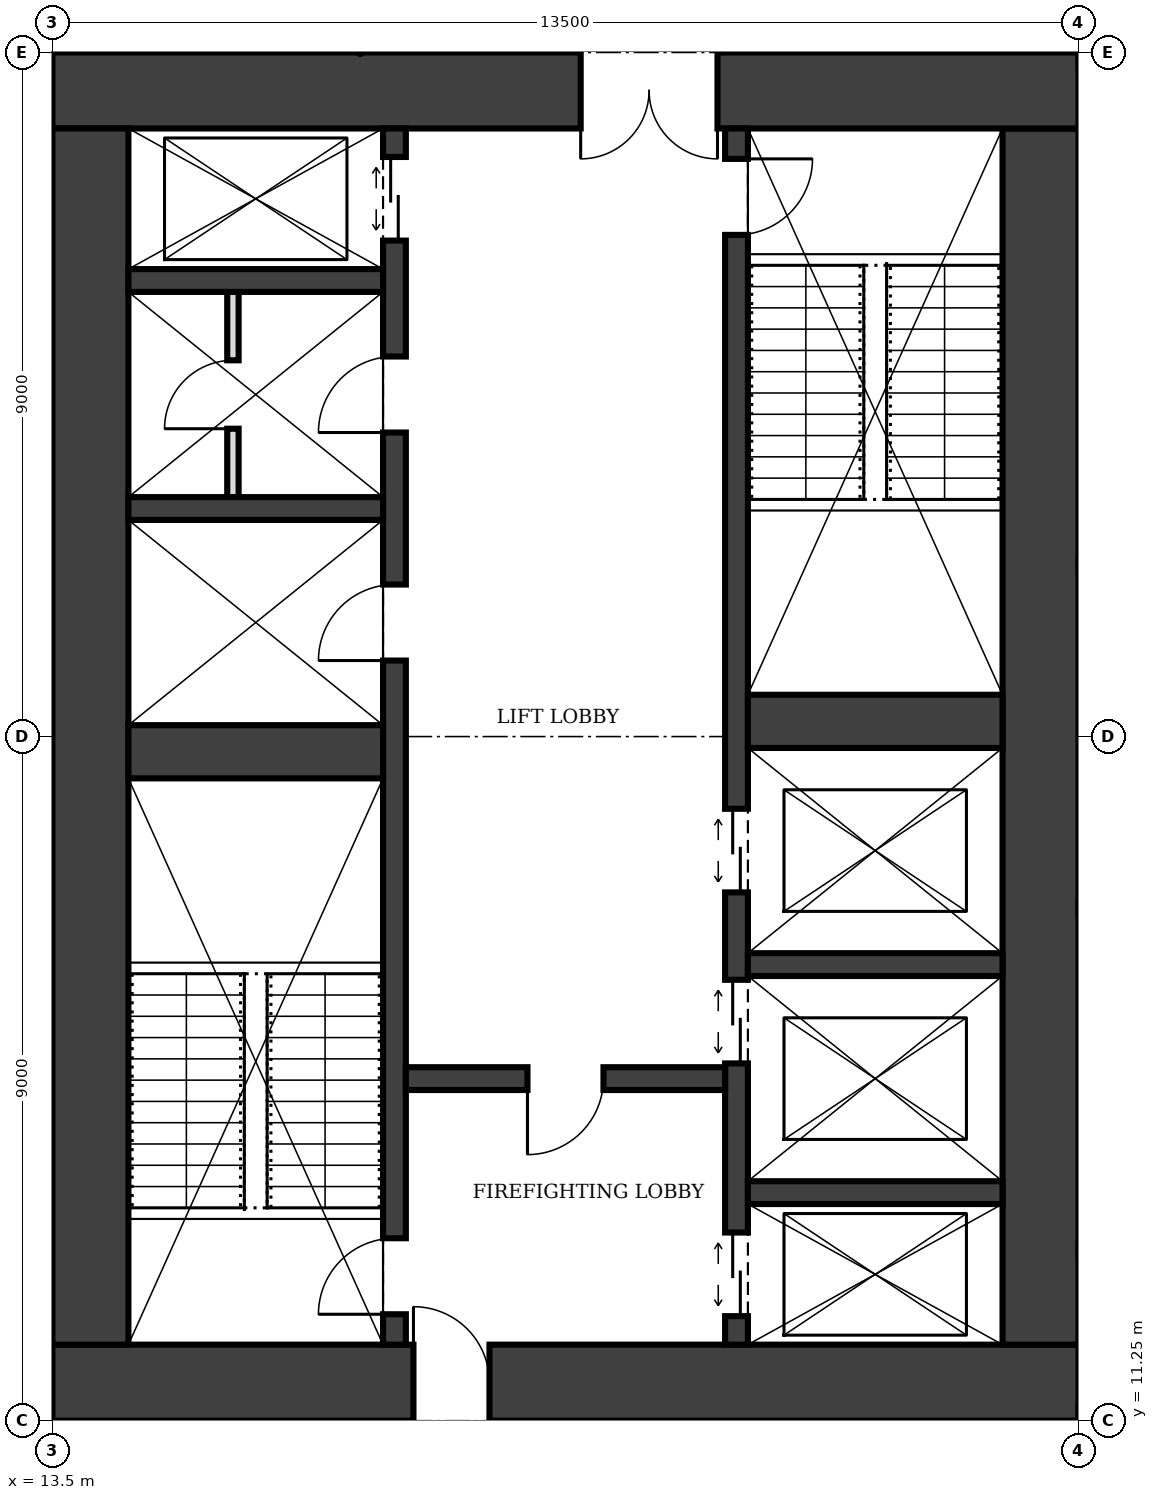
"""IFC4 building model, lengths in metres.
Left out: names, types, materials, properties, quantities, classifications, styles, units other than length and angle.
Written with IfcOpenShell. Run it as: python <this file> out.ifc"""

import sys

from ifc_helpers import new_model, si_unit, direction, frame, frame_2d, origin, place, context, subcontext, project, spatial, rectangle, extrude, element, fill, save


model = new_model("IFC4")
c1 = context("Model", 3, precision=1e-05, world=origin(), true_north=direction((0.0, 1.0)))
c2 = subcontext(c1, "Body", "Model", "MODEL_VIEW")
j1 = project(units=[si_unit("LENGTHUNIT", "METRE"), si_unit("PLANEANGLEUNIT", "RADIAN")], contexts=[c1])
p1 = place(None, origin())
s1 = spatial("IfcSite", under=j1, at=p1, CompositionType="ELEMENT")
p2 = place(p1, origin())
s2 = spatial("IfcBuilding", under=s1, at=p2, CompositionType="ELEMENT")
p3 = place(p2, frame((0.0, 0.0, 153.0)))
s3 = spatial("IfcBuildingStorey", under=s2, at=p3, CompositionType="ELEMENT", Elevation=153.0)
p4 = place(p3, frame((13.5, 11.75, 0.0), z_axis=(0.0, 0.0, 1.0), x_axis=(1.0, 0.0, 0.0)))
e1 = element("IfcWall", 1, at=p4, inside=s3, PredefinedType="SHEAR", context=c2, shape_type="SweptSolid", body=[
    extrude(rectangle(XDim=13.5, YDim=1.0, at=frame_2d((6.75, 0.0))), origin(), (0.0, 0.0, 1.0), 4.0),
])
p5 = place(p4, frame((4.75, 0.0, 0.0)))
e2 = element("IfcOpeningElement", 2, at=p5, cuts=e1, PredefinedType="OPENING", context=c2, shape_type="SweptSolid", body=[
    extrude(rectangle(XDim=1.0, YDim=2.1, at=frame_2d((0.5, 1.05))), frame((0.0, 0.51, 0.0), z_axis=(0.0, -1.0, 0.0), x_axis=(1.0, 0.0, 0.0)), (0.0, 0.0, 1.0), 1.02),
])
p6 = place(p3, frame((26.5, 12.25, 0.0), z_axis=(0.0, 0.0, 1.0), x_axis=(0.0, 1.0, 0.0)))
e3 = element("IfcWall", 3, at=p6, inside=s3, PredefinedType="SHEAR", context=c2, shape_type="SweptSolid", body=[
    extrude(rectangle(XDim=16.0, YDim=1.0, at=frame_2d((8.0, 0.0))), origin(), (0.0, 0.0, 1.0), 4.0),
])
p7 = place(p3, frame((27.0, 28.75, 0.0), z_axis=(0.0, 0.0, 1.0), x_axis=(-1.0, 0.0, 0.0)))
e4 = element("IfcWall", 4, at=p7, inside=s3, PredefinedType="SHEAR", context=c2, shape_type="SweptSolid", body=[
    extrude(rectangle(XDim=13.5, YDim=1.0, at=frame_2d((6.75, 0.0))), origin(), (0.0, 0.0, 1.0), 4.0),
])
p8 = place(p7, frame((4.75, 0.0, 0.0)))
e5 = element("IfcOpeningElement", 5, at=p8, cuts=e4, PredefinedType="OPENING", context=c2, shape_type="SweptSolid", body=[
    extrude(rectangle(XDim=1.8, YDim=2.1, at=frame_2d((0.9, 1.05))), frame((0.0, 0.51, 0.0), z_axis=(0.0, -1.0, 0.0), x_axis=(1.0, 0.0, 0.0)), (0.0, 0.0, 1.0), 1.02),
])
p9 = place(p3, frame((14.0, 28.25, 0.0), z_axis=(0.0, 0.0, 1.0), x_axis=(0.0, -1.0, 0.0)))
e6 = element("IfcWall", 6, at=p9, inside=s3, PredefinedType="SHEAR", context=c2, shape_type="SweptSolid", body=[
    extrude(rectangle(XDim=16.0, YDim=1.0, at=frame_2d((8.0, 0.0))), origin(), (0.0, 0.0, 1.0), 4.0),
])
p10 = place(p3, frame((18.0, 12.25, 0.0), z_axis=(0.0, 0.0, 1.0), x_axis=(0.0, 1.0, 0.0)))
e7 = element("IfcWall", 7, at=p10, inside=s3, PredefinedType="SHEAR", context=c2, shape_type="SweptSolid", body=[
    extrude(rectangle(XDim=16.0, YDim=0.3, at=frame_2d((8.0, 0.0))), origin(), (0.0, 0.0, 1.0), 4.0),
])
p11 = place(p10, frame((0.4, 0.0, 0.0)))
e8 = element("IfcOpeningElement", 8, at=p11, cuts=e7, PredefinedType="OPENING", context=c2, shape_type="SweptSolid", body=[
    extrude(rectangle(XDim=1.0, YDim=2.1, at=frame_2d((0.5, 1.05))), frame((0.0, 0.16, 0.0), z_axis=(0.0, -1.0, 0.0), x_axis=(1.0, 0.0, 0.0)), (0.0, 0.0, 1.0), 0.32),
])
p12 = place(p10, frame((14.525, 0.0, 0.0)))
e9 = element("IfcOpeningElement", 9, at=p12, cuts=e7, PredefinedType="OPENING", context=c2, shape_type="SweptSolid", body=[
    extrude(rectangle(XDim=1.1, YDim=2.1, at=frame_2d((0.55, 1.05))), frame((0.0, 0.16, 0.0), z_axis=(0.0, -1.0, 0.0), x_axis=(1.0, 0.0, 0.0)), (0.0, 0.0, 1.0), 0.32),
])
p13 = place(p10, frame((9.0, 0.0, 0.0)))
e10 = element("IfcOpeningElement", 10, at=p13, cuts=e7, PredefinedType="OPENING", context=c2, shape_type="SweptSolid", body=[
    extrude(rectangle(XDim=1.0, YDim=2.1, at=frame_2d((0.5, 1.05))), frame((0.0, 0.16, 0.0), z_axis=(0.0, -1.0, 0.0), x_axis=(1.0, 0.0, 0.0)), (0.0, 0.0, 1.0), 0.32),
])
p14 = place(p10, frame((12.0, 0.0, 0.0)))
e11 = element("IfcOpeningElement", 11, at=p14, cuts=e7, PredefinedType="OPENING", context=c2, shape_type="SweptSolid", body=[
    extrude(rectangle(XDim=1.0, YDim=2.1, at=frame_2d((0.5, 1.05))), frame((0.0, 0.16, 0.0), z_axis=(0.0, -1.0, 0.0), x_axis=(1.0, 0.0, 0.0)), (0.0, 0.0, 1.0), 0.32),
])
p15 = place(p3, frame((22.5, 12.25, 0.0), z_axis=(0.0, 0.0, 1.0), x_axis=(0.0, 1.0, 0.0)))
e12 = element("IfcWall", 12, at=p15, inside=s3, PredefinedType="SHEAR", context=c2, shape_type="SweptSolid", body=[
    extrude(rectangle(XDim=16.0, YDim=0.3, at=frame_2d((8.0, 0.0))), origin(), (0.0, 0.0, 1.0), 4.0),
])
p16 = place(p15, frame((14.6, 0.0, 0.0)))
e13 = element("IfcOpeningElement", 13, at=p16, cuts=e12, PredefinedType="OPENING", context=c2, shape_type="SweptSolid", body=[
    extrude(rectangle(XDim=1.0, YDim=2.1, at=frame_2d((0.5, 1.05))), frame((0.0, 0.16, 0.0), z_axis=(0.0, -1.0, 0.0), x_axis=(1.0, 0.0, 0.0)), (0.0, 0.0, 1.0), 0.32),
])
p17 = place(p15, frame((0.375, 0.0, 0.0)))
e14 = element("IfcOpeningElement", 14, at=p17, cuts=e12, PredefinedType="OPENING", context=c2, shape_type="SweptSolid", body=[
    extrude(rectangle(XDim=1.1, YDim=2.1, at=frame_2d((0.55, 1.05))), frame((0.0, 0.16, 0.0), z_axis=(0.0, -1.0, 0.0), x_axis=(1.0, 0.0, 0.0)), (0.0, 0.0, 1.0), 0.32),
])
p18 = place(p15, frame((3.7, 0.0, 0.0)))
e15 = element("IfcOpeningElement", 15, at=p18, cuts=e12, PredefinedType="OPENING", context=c2, shape_type="SweptSolid", body=[
    extrude(rectangle(XDim=1.1, YDim=2.1, at=frame_2d((0.55, 1.05))), frame((0.0, 0.16, 0.0), z_axis=(0.0, -1.0, 0.0), x_axis=(1.0, 0.0, 0.0)), (0.0, 0.0, 1.0), 0.32),
])
p19 = place(p15, frame((5.95, 0.0, 0.0)))
e16 = element("IfcOpeningElement", 16, at=p19, cuts=e12, PredefinedType="OPENING", context=c2, shape_type="SweptSolid", body=[
    extrude(rectangle(XDim=1.1, YDim=2.1, at=frame_2d((0.55, 1.05))), frame((0.0, 0.16, 0.0), z_axis=(0.0, -1.0, 0.0), x_axis=(1.0, 0.0, 0.0)), (0.0, 0.0, 1.0), 0.32),
])
p20 = place(p3, frame((14.5, 20.05, 0.0), z_axis=(0.0, 0.0, 1.0), x_axis=(1.0, 0.0, 0.0)))
e17 = element("IfcWall", 17, at=p20, inside=s3, PredefinedType="SHEAR", context=c2, shape_type="SweptSolid", body=[
    extrude(rectangle(XDim=3.35, YDim=0.7, at=frame_2d((1.675, 0.0))), origin(), (0.0, 0.0, 1.0), 4.0),
])
p21 = place(p3, frame((18.15, 15.75, 0.0), z_axis=(0.0, 0.0, 1.0), x_axis=(1.0, 0.0, 0.0)))
e18 = element("IfcWall", 18, at=p21, inside=s3, PredefinedType="SHEAR", context=c2, shape_type="SweptSolid", body=[
    extrude(rectangle(XDim=4.2, YDim=0.3, at=frame_2d((2.1, 0.0))), origin(), (0.0, 0.0, 1.0), 4.0),
])
p22 = place(p21, frame((1.6, 0.0, 0.0)))
e19 = element("IfcOpeningElement", 19, at=p22, cuts=e18, PredefinedType="OPENING", context=c2, shape_type="SweptSolid", body=[
    extrude(rectangle(XDim=1.0, YDim=2.1, at=frame_2d((0.5, 1.05))), frame((0.0, 0.16, 0.0), z_axis=(0.0, -1.0, 0.0), x_axis=(1.0, 0.0, 0.0)), (0.0, 0.0, 1.0), 0.32),
])
for number, where, z_axis, x_axis in (
    (20, (22.65, 14.25, 0.0), (0.0, 0.0, 1.0), (1.0, 0.0, 0.0)),
    (21, (22.65, 17.25, 0.0), (0.0, 0.0, 1.0), (1.0, 0.0, 0.0)),
):
    element("IfcWall", number, at=place(p3, frame(where, z_axis=z_axis, x_axis=x_axis)), inside=s3, PredefinedType="SHEAR", context=c2, shape_type="SweptSolid", body=[
        extrude(rectangle(XDim=3.35, YDim=0.3, at=frame_2d((1.675, 0.0))), origin(), (0.0, 0.0, 1.0), 4.0),
    ])
p23 = place(p3, frame((22.65, 20.45, 0.0), z_axis=(0.0, 0.0, 1.0), x_axis=(1.0, 0.0, 0.0)))
e22 = element("IfcWall", 22, at=p23, inside=s3, PredefinedType="SHEAR", context=c2, shape_type="SweptSolid", body=[
    extrude(rectangle(XDim=3.35, YDim=0.7, at=frame_2d((1.675, 0.0))), origin(), (0.0, 0.0, 1.0), 4.0),
])
for number, where, z_axis, x_axis in (
    (23, (14.5, 23.25, 0.0), (0.0, 0.0, 1.0), (1.0, 0.0, 0.0)),
    (24, (14.5, 26.25, 0.0), (0.0, 0.0, 1.0), (1.0, 0.0, 0.0)),
):
    element("IfcWall", number, at=place(p3, frame(where, z_axis=z_axis, x_axis=x_axis)), inside=s3, PredefinedType="SHEAR", context=c2, shape_type="SweptSolid", body=[
        extrude(rectangle(XDim=3.35, YDim=0.3, at=frame_2d((1.675, 0.0))), origin(), (0.0, 0.0, 1.0), 4.0),
    ])
p24 = place(p3, frame((15.875, 23.4, 0.0), z_axis=(0.0, 0.0, 1.0), x_axis=(0.0, 1.0, 0.0)))
e25 = element("IfcWall", 25, at=p24, inside=s3, PredefinedType="PARTITIONING", context=c2, shape_type="SweptSolid", body=[
    extrude(rectangle(XDim=2.7, YDim=0.15, at=frame_2d((1.35, 0.0))), origin(), (0.0, 0.0, 1.0), 3.75),
])
p25 = place(p24, frame((0.9, 0.0, 0.0)))
e26 = element("IfcOpeningElement", 26, at=p25, cuts=e25, PredefinedType="OPENING", context=c2, shape_type="SweptSolid", body=[
    extrude(rectangle(XDim=0.9, YDim=2.1, at=frame_2d((0.45, 1.05))), frame((0.0, 0.085, 0.0), z_axis=(0.0, -1.0, 0.0), x_axis=(1.0, 0.0, 0.0)), (0.0, 0.0, 1.0), 0.17),
])
for number, where, z_axis, x_axis in (
    (27, (27.0, 11.35, 0.0), (0.0, 0.0, 1.0), (1.0, 0.0, 0.0)),
    (28, (27.0, 29.15, 0.0), (0.0, 0.0, 1.0), (1.0, 0.0, 0.0)),
):
    element("IfcWall", number, at=place(p3, frame(where, z_axis=z_axis, x_axis=x_axis)), inside=s3, PredefinedType="SOLIDWALL", context=c2, shape_type="SweptSolid", body=[
        extrude(rectangle(XDim=7.93, YDim=0.2, at=frame_2d((3.965, 0.0))), origin(), (0.0, 0.0, 1.0), 2.85),
    ])
p26 = place(p5, origin())
e29 = element("IfcDoor", 29, at=p26, inside=s3, OperationType="SINGLE_SWING_LEFT", PredefinedType="DOOR", context=c2, shape_type="SweptSolid", body=[
    extrude(rectangle(XDim=1.0, YDim=2.1, at=frame_2d((0.5, 1.05))), frame((0.0, 0.025, 0.0), z_axis=(0.0, -1.0, 0.0), x_axis=(1.0, 0.0, 0.0)), (0.0, 0.0, 1.0), 0.05),
])
fill(e2, e29)
p27 = place(p8, origin())
e30 = element("IfcDoor", 30, at=p27, inside=s3, OperationType="DOUBLE_DOOR_SINGLE_SWING", PredefinedType="DOOR", context=c2, shape_type="SweptSolid", body=[
    extrude(rectangle(XDim=1.8, YDim=2.1, at=frame_2d((0.9, 1.05))), frame((0.0, 0.025, 0.0), z_axis=(0.0, -1.0, 0.0), x_axis=(1.0, 0.0, 0.0)), (0.0, 0.0, 1.0), 0.05),
])
fill(e5, e30)
p28 = place(p22, frame((1.0, 0.0, 0.0), z_axis=(0.0, 0.0, 1.0), x_axis=(-1.0, 0.0, 0.0)))
e31 = element("IfcDoor", 31, at=p28, inside=s3, OperationType="SINGLE_SWING_RIGHT", PredefinedType="DOOR", context=c2, shape_type="SweptSolid", body=[
    extrude(rectangle(XDim=1.0, YDim=2.1, at=frame_2d((0.5, 1.05))), frame((0.0, 0.025, 0.0), z_axis=(0.0, -1.0, 0.0), x_axis=(1.0, 0.0, 0.0)), (0.0, 0.0, 1.0), 0.05),
])
fill(e19, e31)
p29 = place(p11, origin())
e32 = element("IfcDoor", 32, at=p29, inside=s3, OperationType="SINGLE_SWING_LEFT", PredefinedType="DOOR", context=c2, shape_type="SweptSolid", body=[
    extrude(rectangle(XDim=1.0, YDim=2.1, at=frame_2d((0.5, 1.05))), frame((0.0, 0.025, 0.0), z_axis=(0.0, -1.0, 0.0), x_axis=(1.0, 0.0, 0.0)), (0.0, 0.0, 1.0), 0.05),
])
fill(e8, e32)
p30 = place(p16, frame((1.0, 0.0, 0.0), z_axis=(0.0, 0.0, 1.0), x_axis=(-1.0, 0.0, 0.0)))
e33 = element("IfcDoor", 33, at=p30, inside=s3, OperationType="SINGLE_SWING_LEFT", PredefinedType="DOOR", context=c2, shape_type="SweptSolid", body=[
    extrude(rectangle(XDim=1.0, YDim=2.1, at=frame_2d((0.5, 1.05))), frame((0.0, 0.025, 0.0), z_axis=(0.0, -1.0, 0.0), x_axis=(1.0, 0.0, 0.0)), (0.0, 0.0, 1.0), 0.05),
])
fill(e13, e33)
p31 = place(p17, origin())
e34 = element("IfcDoor", 34, at=p31, inside=s3, OperationType="DOUBLE_DOOR_SLIDING", PredefinedType="DOOR", context=c2, shape_type="SweptSolid", body=[
    extrude(rectangle(XDim=1.1, YDim=2.1, at=frame_2d((0.55, 1.05))), frame((0.0, 0.025, 0.0), z_axis=(0.0, -1.0, 0.0), x_axis=(1.0, 0.0, 0.0)), (0.0, 0.0, 1.0), 0.05),
])
fill(e14, e34)
p32 = place(p12, origin())
e35 = element("IfcDoor", 35, at=p32, inside=s3, OperationType="DOUBLE_DOOR_SLIDING", PredefinedType="DOOR", context=c2, shape_type="SweptSolid", body=[
    extrude(rectangle(XDim=1.1, YDim=2.1, at=frame_2d((0.55, 1.05))), frame((0.0, 0.025, 0.0), z_axis=(0.0, -1.0, 0.0), x_axis=(1.0, 0.0, 0.0)), (0.0, 0.0, 1.0), 0.05),
])
fill(e9, e35)
p33 = place(p18, origin())
e36 = element("IfcDoor", 36, at=p33, inside=s3, OperationType="DOUBLE_DOOR_SLIDING", PredefinedType="DOOR", context=c2, shape_type="SweptSolid", body=[
    extrude(rectangle(XDim=1.1, YDim=2.1, at=frame_2d((0.55, 1.05))), frame((0.0, 0.025, 0.0), z_axis=(0.0, -1.0, 0.0), x_axis=(1.0, 0.0, 0.0)), (0.0, 0.0, 1.0), 0.05),
])
fill(e15, e36)
p34 = place(p19, origin())
e37 = element("IfcDoor", 37, at=p34, inside=s3, OperationType="DOUBLE_DOOR_SLIDING", PredefinedType="DOOR", context=c2, shape_type="SweptSolid", body=[
    extrude(rectangle(XDim=1.1, YDim=2.1, at=frame_2d((0.55, 1.05))), frame((0.0, 0.025, 0.0), z_axis=(0.0, -1.0, 0.0), x_axis=(1.0, 0.0, 0.0)), (0.0, 0.0, 1.0), 0.05),
])
fill(e16, e37)
p35 = place(p13, origin())
e38 = element("IfcDoor", 38, at=p35, inside=s3, OperationType="SINGLE_SWING_LEFT", PredefinedType="DOOR", context=c2, shape_type="SweptSolid", body=[
    extrude(rectangle(XDim=1.0, YDim=2.1, at=frame_2d((0.5, 1.05))), frame((0.0, 0.025, 0.0), z_axis=(0.0, -1.0, 0.0), x_axis=(1.0, 0.0, 0.0)), (0.0, 0.0, 1.0), 0.05),
])
fill(e10, e38)
p36 = place(p14, origin())
e39 = element("IfcDoor", 39, at=p36, inside=s3, OperationType="SINGLE_SWING_LEFT", PredefinedType="DOOR", context=c2, shape_type="SweptSolid", body=[
    extrude(rectangle(XDim=1.0, YDim=2.1, at=frame_2d((0.5, 1.05))), frame((0.0, 0.025, 0.0), z_axis=(0.0, -1.0, 0.0), x_axis=(1.0, 0.0, 0.0)), (0.0, 0.0, 1.0), 0.05),
])
fill(e11, e39)
p37 = place(p25, origin())
e40 = element("IfcDoor", 40, at=p37, inside=s3, OperationType="SINGLE_SWING_LEFT", PredefinedType="DOOR", context=c2, shape_type="SweptSolid", body=[
    extrude(rectangle(XDim=0.9, YDim=2.1, at=frame_2d((0.45, 1.05))), frame((0.0, 0.025, 0.0), z_axis=(0.0, -1.0, 0.0), x_axis=(1.0, 0.0, 0.0)), (0.0, 0.0, 1.0), 0.05),
])
fill(e26, e40)
save(model, sys.argv[1])
